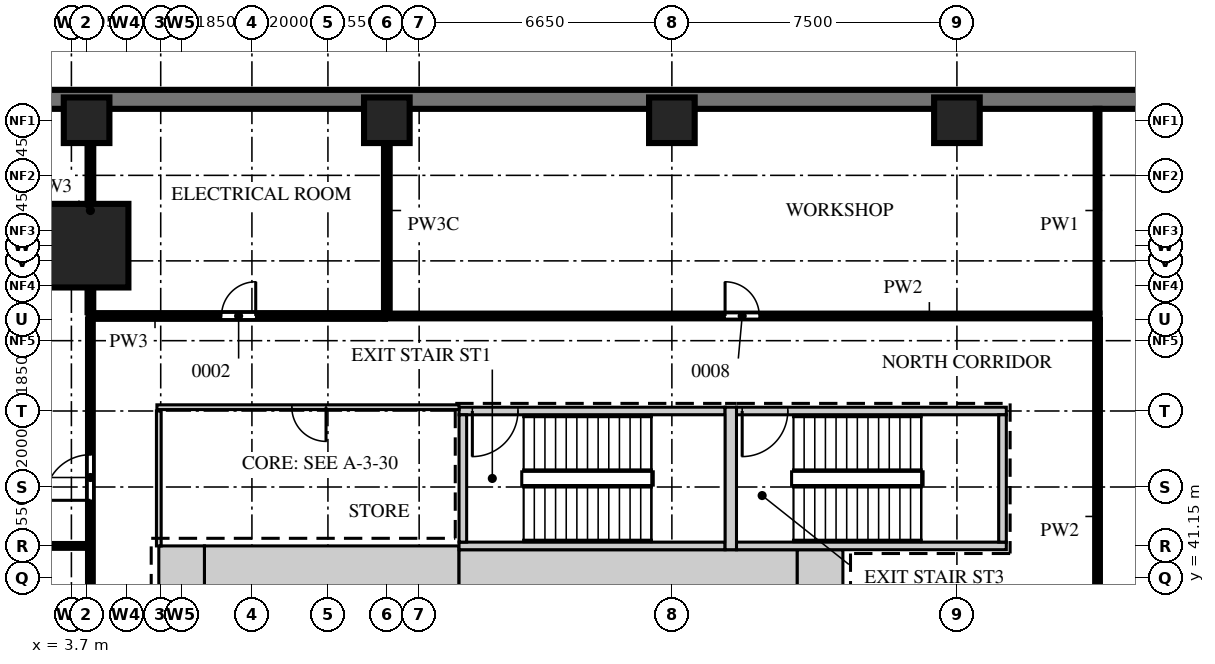
"""IFC4 building model, lengths in metres.
Left out: names, types, materials, properties, quantities, classifications, styles, units other than length and angle.
Written with IfcOpenShell. Run it as: python <this file> out.ifc"""

import sys

from ifc_helpers import new_model, si_unit, direction, frame, frame_2d, origin, origin_2d, place, context, subcontext, project, spatial, rectangle, extrude, source, transform, mapped, element, fill, save


model = new_model("IFC4")
c1 = context("Model", 3, precision=1e-05, world=origin(), true_north=direction((0.0, 1.0)))
c2 = subcontext(c1, "Body", "Model", "MODEL_VIEW")
j1 = project(units=[si_unit("LENGTHUNIT", "METRE"), si_unit("PLANEANGLEUNIT", "RADIAN")], contexts=[c1])
p1 = place(None, origin())
s1 = spatial("IfcSite", under=j1, at=p1, CompositionType="ELEMENT")
p2 = place(p1, origin())
s2 = spatial("IfcBuilding", under=s1, at=p2, CompositionType="ELEMENT")
p3 = place(p2, frame((0.0, 0.0, -4.5)))
s3 = spatial("IfcBuildingStorey", under=s2, at=p3, CompositionType="ELEMENT", Elevation=-4.5)
m1 = source(origin(), c2, "Body", "SweptSolid", [
    extrude(rectangle(XDim=6.7, YDim=1.2, at=frame_2d((3.35, 0.0))), origin(), (0.0, 0.0, 1.0), 4.15),
])
p4 = place(p3, frame((7.2, 41.4, 0.0), z_axis=(0.0, 0.0, 1.0), x_axis=(1.0, 0.0, 0.0)))
e1 = element("IfcWall", 1, at=p4, inside=s3, PredefinedType="SHEAR", context=c2, shape_type="MappedRepresentation", body=[
    mapped(m1, transform((0.0, 0.0, 0.0))),
])
m2 = source(origin(), c2, "Body", "SweptSolid", [
    extrude(rectangle(XDim=8.9, YDim=1.1, at=frame_2d((4.45, 0.0))), origin(), (0.0, 0.0, 1.0), 4.15),
])
p5 = place(p3, frame((13.9, 41.35, 0.0), z_axis=(0.0, 0.0, 1.0), x_axis=(1.0, 0.0, 0.0)))
e2 = element("IfcWall", 2, at=p5, inside=s3, PredefinedType="SHEAR", context=c2, shape_type="MappedRepresentation", body=[
    mapped(m2, transform((0.0, 0.0, 0.0))),
])
m3 = source(origin(), c2, "Body", "SweptSolid", [
    extrude(rectangle(XDim=1.2, YDim=1.1, at=frame_2d((0.6, 0.0))), origin(), (0.0, 0.0, 1.0), 4.15),
])
p6 = place(p3, frame((22.8, 41.35, 0.0), z_axis=(0.0, 0.0, 1.0), x_axis=(1.0, 0.0, 0.0)))
e3 = element("IfcWall", 3, at=p6, inside=s3, PredefinedType="SHEAR", context=c2, shape_type="MappedRepresentation", body=[
    mapped(m3, transform((0.0, 0.0, 0.0))),
])
m4 = source(origin(), c2, "Body", "SweptSolid", [
    extrude(rectangle(XDim=1.2, YDim=1.2, at=frame_2d((0.6, 0.0))), origin(), (0.0, 0.0, 1.0), 4.15),
])
p7 = place(p3, frame((6.0, 41.4, 0.0), z_axis=(0.0, 0.0, 1.0), x_axis=(1.0, 0.0, 0.0)))
e4 = element("IfcWall", 4, at=p7, inside=s3, PredefinedType="SHEAR", context=c2, shape_type="MappedRepresentation", body=[
    mapped(m4, transform((0.0, 0.0, 0.0))),
])
m5 = source(origin(), c2, "Body", "SweptSolid", [
    extrude(rectangle(XDim=7.0, YDim=0.2, at=frame_2d((3.5, 0.0))), origin(), (0.0, 0.0, 1.0), 4.15),
])
p8 = place(p3, frame((13.9, 45.55, 0.0), z_axis=(0.0, 0.0, 1.0), x_axis=(1.0, 0.0, 0.0)))
e5 = element("IfcWall", 5, at=p8, inside=s3, PredefinedType="SHEAR", context=c2, shape_type="MappedRepresentation", body=[
    mapped(m5, transform((0.0, 0.0, 0.0))),
])
m6 = source(origin(), c2, "Body", "SweptSolid", [
    extrude(rectangle(XDim=1.2, YDim=2.1, at=frame_2d((0.6, 1.05))), frame((0.0, 0.11, 0.0), z_axis=(0.0, -1.0, 0.0), x_axis=(1.0, 0.0, 0.0)), (0.0, 0.0, 1.0), 0.22),
])
p9 = place(p8, frame((0.35, 0.0, 0.0)))
e6 = element("IfcOpeningElement", 6, at=p9, cuts=e5, PredefinedType="OPENING", context=c2, shape_type="MappedRepresentation", body=[
    mapped(m6, transform((0.0, 0.0, 0.0))),
])
p10 = place(p3, frame((13.9, 42.0, 0.0), z_axis=(0.0, 0.0, 1.0), x_axis=(1.0, 0.0, 0.0)))
e7 = element("IfcWall", 7, at=p10, inside=s3, PredefinedType="SHEAR", context=c2, shape_type="MappedRepresentation", body=[
    mapped(m5, transform((0.0, 0.0, 0.0))),
])
m7 = source(origin(), c2, "Body", "SweptSolid", [
    extrude(rectangle(XDim=7.1, YDim=0.2, at=frame_2d((3.55, 0.0))), origin(), (0.0, 0.0, 1.0), 4.15),
])
p11 = place(p3, frame((21.2, 45.55, 0.0), z_axis=(0.0, 0.0, 1.0), x_axis=(1.0, 0.0, 0.0)))
e8 = element("IfcWall", 8, at=p11, inside=s3, PredefinedType="SHEAR", context=c2, shape_type="MappedRepresentation", body=[
    mapped(m7, transform((0.0, 0.0, 0.0))),
])
p12 = place(p11, frame((0.15, 0.0, 0.0)))
e9 = element("IfcOpeningElement", 9, at=p12, cuts=e8, PredefinedType="OPENING", context=c2, shape_type="MappedRepresentation", body=[
    mapped(m6, transform((0.0, 0.0, 0.0))),
])
p13 = place(p3, frame((21.2, 42.0, 0.0), z_axis=(0.0, 0.0, 1.0), x_axis=(1.0, 0.0, 0.0)))
e10 = element("IfcWall", 10, at=p13, inside=s3, PredefinedType="SHEAR", context=c2, shape_type="MappedRepresentation", body=[
    mapped(m7, transform((0.0, 0.0, 0.0))),
])
m8 = source(origin(), c2, "Body", "SweptSolid", [
    extrude(rectangle(XDim=3.75, YDim=0.3, at=frame_2d((1.875, 0.0))), origin(), (0.0, 0.0, 1.0), 4.15),
])
p14 = place(p3, frame((21.05, 41.9, 0.0), z_axis=(0.0, 0.0, 1.0), x_axis=(0.0, 1.0, 0.0)))
e11 = element("IfcWall", 11, at=p14, inside=s3, PredefinedType="SHEAR", context=c2, shape_type="MappedRepresentation", body=[
    mapped(m8, transform((0.0, 0.0, 0.0))),
])
m9 = source(origin(), c2, "Body", "SweptSolid", [
    extrude(rectangle(XDim=3.35, YDim=0.2, at=frame_2d((1.675, 0.0))), origin(), (0.0, 0.0, 1.0), 4.15),
])
for number, where, z_axis, x_axis in (
    (12, (14.0, 42.1, 0.0), (0.0, 0.0, 1.0), (0.0, 1.0, 0.0)),
    (13, (28.2, 42.1, 0.0), (0.0, 0.0, 1.0), (0.0, 1.0, 0.0)),
):
    element("IfcWall", number, at=place(p3, frame(where, z_axis=z_axis, x_axis=x_axis)), inside=s3, PredefinedType="SHEAR", context=c2, shape_type="MappedRepresentation", body=[
        mapped(m9, transform((0.0, 0.0, 0.0))),
    ])
m10 = source(origin(), c2, "Body", "SweptSolid", [
    extrude(rectangle(XDim=90.0, YDim=0.5, at=frame_2d((45.0, 0.0))), origin(), (0.0, 0.0, 1.0), 4.15),
])
p15 = place(p3, frame((-9.0, 53.75, 0.0), z_axis=(0.0, 0.0, 1.0), x_axis=(1.0, 0.0, 0.0)))
e14 = element("IfcWall", 14, at=p15, inside=s3, PredefinedType="STANDARD", context=c2, shape_type="MappedRepresentation", body=[
    mapped(m10, transform((0.0, 0.0, 0.0))),
])
m11 = source(origin(), c2, "Body", "SweptSolid", [
    extrude(rectangle(XDim=2.2, YDim=2.2, at=origin_2d()), origin(), (0.0, 0.0, 1.0), 4.5),
])
p16 = place(p3, frame((4.1, 49.9, 0.0), z_axis=(0.0, 0.0, 1.0), x_axis=(1.0, 0.0, 0.0)))
e15 = element("IfcColumn", 15, at=p16, inside=s3, PredefinedType="COLUMN", context=c2, shape_type="MappedRepresentation", body=[
    mapped(m11, transform((0.0, 0.0, 0.0))),
])
m12 = source(origin(), c2, "Body", "SweptSolid", [
    extrude(rectangle(XDim=1.2, YDim=1.2, at=origin_2d()), origin(), (0.0, 0.0, 1.0), 4.15),
])
for number, where, z_axis, x_axis in (
    (16, (4.1, 53.2, 0.0), (0.0, 0.0, 1.0), (1.0, 0.0, 0.0)),
    (17, (12.0, 53.2, 0.0), (0.0, 0.0, 1.0), (1.0, 0.0, 0.0)),
    (18, (19.5, 53.2, 0.0), (0.0, 0.0, 1.0), (1.0, 0.0, 0.0)),
    (19, (27.0, 53.2, 0.0), (0.0, 0.0, 1.0), (1.0, 0.0, 0.0)),
):
    element("IfcColumn", number, at=place(p3, frame(where, z_axis=z_axis, x_axis=x_axis)), inside=s3, PredefinedType="COLUMN", context=c2, shape_type="MappedRepresentation", body=[
        mapped(m12, transform((0.0, 0.0, 0.0))),
    ])
m13 = source(origin(), c2, "Body", "SweptSolid", [
    extrude(rectangle(XDim=41.8, YDim=0.125, at=frame_2d((20.9, 0.0))), origin(), (0.0, 0.0, 1.0), 4.15),
])
p17 = place(p3, frame((4.2, 6.15, 0.0), z_axis=(0.0, 0.0, 1.0), x_axis=(0.0, 1.0, 0.0)))
e20 = element("IfcWall", 20, at=p17, inside=s3, PredefinedType="PARTITIONING", context=c2, shape_type="MappedRepresentation", body=[
    mapped(m13, transform((0.0, 0.0, 0.0))),
])
m14 = source(origin(), c2, "Body", "SweptSolid", [
    extrude(rectangle(XDim=1.2, YDim=2.1, at=frame_2d((0.6, 1.05))), frame((0.0, 0.073, 0.0), z_axis=(0.0, -1.0, 0.0), x_axis=(1.0, 0.0, 0.0)), (0.0, 0.0, 1.0), 0.145),
])
p18 = place(p17, frame((4.45, 0.0, 0.0)))
e21 = element("IfcOpeningElement", 21, at=p18, cuts=e20, PredefinedType="OPENING", context=c2, shape_type="MappedRepresentation", body=[
    mapped(m14, transform((0.0, 0.0, 0.0))),
])
p19 = place(p17, frame((21.25, 0.0, 0.0)))
e22 = element("IfcOpeningElement", 22, at=p19, cuts=e20, PredefinedType="OPENING", context=c2, shape_type="MappedRepresentation", body=[
    mapped(m14, transform((0.0, 0.0, 0.0))),
])
p20 = place(p17, frame((37.05, 0.0, 0.0)))
e23 = element("IfcOpeningElement", 23, at=p20, cuts=e20, PredefinedType="OPENING", context=c2, shape_type="MappedRepresentation", body=[
    mapped(m14, transform((0.0, 0.0, 0.0))),
])
m15 = source(origin(), c2, "Body", "SweptSolid", [
    extrude(rectangle(XDim=10.35, YDim=0.125, at=frame_2d((5.175, 0.0))), origin(), (0.0, 0.0, 1.0), 4.15),
])
p21 = place(p3, frame((30.7, 37.6, 0.0), z_axis=(0.0, 0.0, 1.0), x_axis=(0.0, 1.0, 0.0)))
e24 = element("IfcWall", 24, at=p21, inside=s3, PredefinedType="PARTITIONING", context=c2, shape_type="MappedRepresentation", body=[
    mapped(m15, transform((0.0, 0.0, 0.0))),
])
m16 = source(origin(), c2, "Body", "SweptSolid", [
    extrude(rectangle(XDim=12.6, YDim=0.1, at=frame_2d((6.3, 0.0))), origin(), (0.0, 0.0, 1.0), 4.15),
])
p22 = place(p3, frame((-8.5, 42.0, 0.0), z_axis=(0.0, 0.0, 1.0), x_axis=(1.0, 0.0, 0.0)))
e25 = element("IfcWall", 25, at=p22, inside=s3, PredefinedType="PARTITIONING", context=c2, shape_type="MappedRepresentation", body=[
    mapped(m16, transform((0.0, 0.0, 0.0))),
])
m17 = source(origin(), c2, "Body", "SweptSolid", [
    extrude(rectangle(XDim=3.55, YDim=0.125, at=frame_2d((1.775, 0.0))), origin(), (0.0, 0.0, 1.0), 4.15),
])
p23 = place(p3, frame((6.0, 42.0, 0.0), z_axis=(0.0, 0.0, 1.0), x_axis=(0.0, 1.0, 0.0)))
e26 = element("IfcWall", 26, at=p23, inside=s3, PredefinedType="PARTITIONING", context=c2, shape_type="MappedRepresentation", body=[
    mapped(m17, transform((0.0, 0.0, 0.0))),
])
m18 = source(origin(), c2, "Body", "SweptSolid", [
    extrude(rectangle(XDim=7.95, YDim=0.125, at=frame_2d((3.975, 0.0))), origin(), (0.0, 0.0, 1.0), 4.15),
])
p24 = place(p3, frame((5.95, 45.65, 0.0), z_axis=(0.0, 0.0, 1.0), x_axis=(1.0, 0.0, 0.0)))
e27 = element("IfcWall", 27, at=p24, inside=s3, PredefinedType="PARTITIONING", context=c2, shape_type="MappedRepresentation", body=[
    mapped(m18, transform((0.0, 0.0, 0.0))),
])
m19 = source(origin(), c2, "Body", "SweptSolid", [
    extrude(rectangle(XDim=0.9, YDim=2.1, at=frame_2d((0.45, 1.05))), frame((0.0, 0.073, 0.0), z_axis=(0.0, -1.0, 0.0), x_axis=(1.0, 0.0, 0.0)), (0.0, 0.0, 1.0), 0.145),
])
p25 = place(p24, frame((3.55, 0.0, 0.0)))
e28 = element("IfcOpeningElement", 28, at=p25, cuts=e27, PredefinedType="OPENING", context=c2, shape_type="MappedRepresentation", body=[
    mapped(m19, transform((0.0, 0.0, 0.0))),
])
m20 = source(origin(), c2, "Body", "SweptSolid", [
    extrude(rectangle(XDim=7.8, YDim=0.15, at=frame_2d((3.9, 0.0))), origin(), (0.0, 0.0, 1.0), 4.15),
])
p26 = place(p3, frame((4.15, 48.05, 0.0), z_axis=(0.0, 0.0, 1.0), x_axis=(1.0, 0.0, 0.0)))
e29 = element("IfcWall", 29, at=p26, inside=s3, PredefinedType="PARTITIONING", context=c2, shape_type="MappedRepresentation", body=[
    mapped(m20, transform((0.0, 0.0, 0.0))),
])
m21 = source(origin(), c2, "Body", "SweptSolid", [
    extrude(rectangle(XDim=0.9, YDim=2.1, at=frame_2d((0.45, 1.05))), frame((0.0, 0.085, 0.0), z_axis=(0.0, -1.0, 0.0), x_axis=(1.0, 0.0, 0.0)), (0.0, 0.0, 1.0), 0.17),
])
p27 = place(p26, frame((3.5, 0.0, 0.0)))
e30 = element("IfcOpeningElement", 30, at=p27, cuts=e29, PredefinedType="OPENING", context=c2, shape_type="MappedRepresentation", body=[
    mapped(m21, transform((0.0, 0.0, 0.0))),
])
m22 = source(origin(), c2, "Body", "SweptSolid", [
    extrude(rectangle(XDim=18.8, YDim=0.125, at=frame_2d((9.4, 0.0))), origin(), (0.0, 0.0, 1.0), 4.15),
])
p28 = place(p3, frame((11.95, 48.05, 0.0), z_axis=(0.0, 0.0, 1.0), x_axis=(1.0, 0.0, 0.0)))
e31 = element("IfcWall", 31, at=p28, inside=s3, PredefinedType="PARTITIONING", context=c2, shape_type="MappedRepresentation", body=[
    mapped(m22, transform((0.0, 0.0, 0.0))),
])
p29 = place(p28, frame((8.95, 0.0, 0.0)))
e32 = element("IfcOpeningElement", 32, at=p29, cuts=e31, PredefinedType="OPENING", context=c2, shape_type="MappedRepresentation", body=[
    mapped(m19, transform((0.0, 0.0, 0.0))),
])
m23 = source(origin(), c2, "Body", "SweptSolid", [
    extrude(rectangle(XDim=5.35, YDim=0.15, at=frame_2d((2.675, 0.0))), origin(), (0.0, 0.0, 1.0), 4.15),
])
p30 = place(p3, frame((4.2, 48.15, 0.0), z_axis=(0.0, 0.0, 1.0), x_axis=(0.0, 1.0, 0.0)))
e33 = element("IfcWall", 33, at=p30, inside=s3, PredefinedType="PARTITIONING", context=c2, shape_type="MappedRepresentation", body=[
    mapped(m23, transform((0.0, 0.0, 0.0))),
])
m24 = source(origin(), c2, "Body", "SweptSolid", [
    extrude(rectangle(XDim=5.35, YDim=0.15, at=frame_2d((2.675, 0.0))), origin(), (0.0, 0.0, 1.0), 3.65),
])
p31 = place(p3, frame((12.0, 48.15, 0.0), z_axis=(0.0, 0.0, 1.0), x_axis=(0.0, 1.0, 0.0)))
e34 = element("IfcWall", 34, at=p31, inside=s3, PredefinedType="PARTITIONING", context=c2, shape_type="MappedRepresentation", body=[
    mapped(m24, transform((0.0, 0.0, 0.0))),
])
m25 = source(origin(), c2, "Body", "SweptSolid", [
    extrude(rectangle(XDim=5.35, YDim=0.1, at=frame_2d((2.675, 0.0))), origin(), (0.0, 0.0, 1.0), 4.15),
])
p32 = place(p3, frame((30.7, 48.15, 0.0), z_axis=(0.0, 0.0, 1.0), x_axis=(0.0, 1.0, 0.0)))
e35 = element("IfcWall", 35, at=p32, inside=s3, PredefinedType="PARTITIONING", context=c2, shape_type="MappedRepresentation", body=[
    mapped(m25, transform((0.0, 0.0, 0.0))),
])
m26 = source(origin(), c2, "Body", "SweptSolid", [
    extrude(rectangle(XDim=0.9, YDim=2.1, at=frame_2d((0.45, 1.05))), frame((0.0, 0.025, 0.0), z_axis=(0.0, -1.0, 0.0), x_axis=(1.0, 0.0, 0.0)), (0.0, 0.0, 1.0), 0.05),
])
p33 = place(p27, origin())
e36 = element("IfcDoor", 36, at=p33, inside=s3, OperationType="SINGLE_SWING_LEFT", PredefinedType="DOOR", context=c2, shape_type="MappedRepresentation", body=[
    mapped(m26, transform((0.0, 0.0, 0.0))),
])
fill(e30, e36)
p34 = place(p29, origin())
e37 = element("IfcDoor", 37, at=p34, inside=s3, OperationType="SINGLE_SWING_RIGHT", PredefinedType="DOOR", context=c2, shape_type="MappedRepresentation", body=[
    mapped(m26, transform((0.0, 0.0, 0.0))),
])
fill(e32, e37)
p35 = place(p25, origin())
e38 = element("IfcDoor", 38, at=p35, inside=s3, OperationType="SINGLE_SWING_RIGHT", PredefinedType="DOOR", context=c2, shape_type="MappedRepresentation", body=[
    mapped(m26, transform((0.0, 0.0, 0.0))),
])
fill(e28, e38)
m27 = source(origin(), c2, "Body", "SweptSolid", [
    extrude(rectangle(XDim=1.2, YDim=2.1, at=frame_2d((0.6, 1.05))), frame((0.0, 0.025, 0.0), z_axis=(0.0, -1.0, 0.0), x_axis=(1.0, 0.0, 0.0)), (0.0, 0.0, 1.0), 0.05),
])
p36 = place(p20, origin())
e39 = element("IfcDoor", 39, at=p36, inside=s3, OperationType="SINGLE_SWING_RIGHT", PredefinedType="DOOR", context=c2, shape_type="MappedRepresentation", body=[
    mapped(m27, transform((0.0, 0.0, 0.0))),
])
fill(e23, e39)
p37 = place(p9, origin())
e40 = element("IfcDoor", 40, at=p37, inside=s3, OperationType="SINGLE_SWING_LEFT", PredefinedType="DOOR", context=c2, shape_type="MappedRepresentation", body=[
    mapped(m27, transform((0.0, 0.0, 0.0))),
])
fill(e6, e40)
p38 = place(p12, origin())
e41 = element("IfcDoor", 41, at=p38, inside=s3, OperationType="SINGLE_SWING_LEFT", PredefinedType="DOOR", context=c2, shape_type="MappedRepresentation", body=[
    mapped(m27, transform((0.0, 0.0, 0.0))),
])
fill(e9, e41)
save(model, sys.argv[1])
